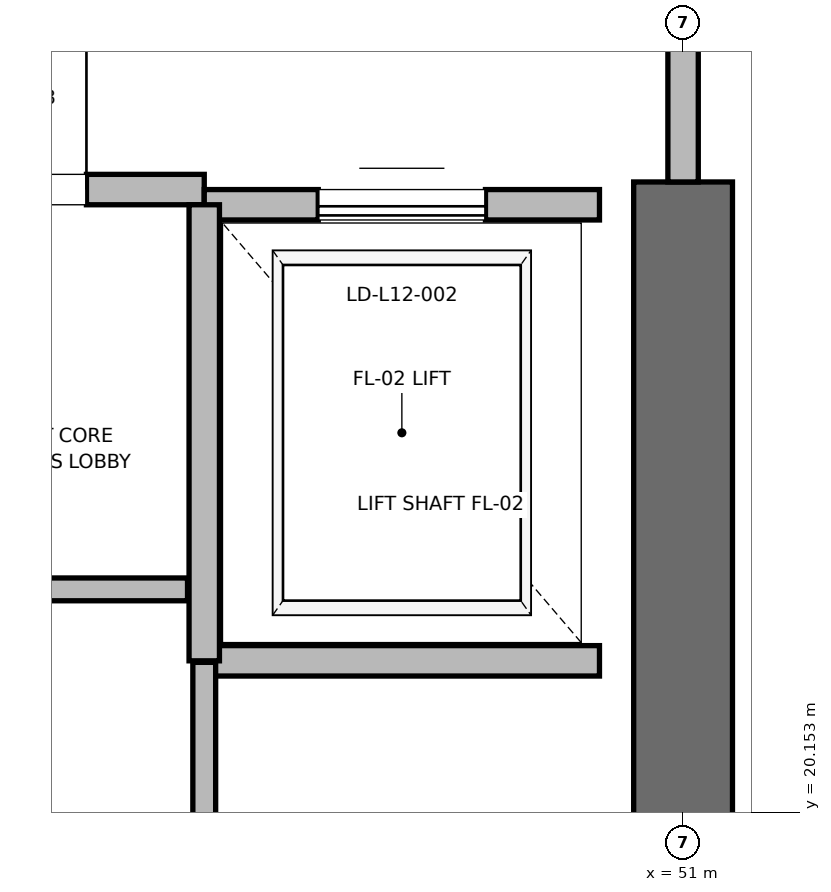
"""IFC4 building model, lengths in metres.
Left out: names, types, materials, properties, quantities, classifications, styles, units other than length and angle.
Written with IfcOpenShell. Run it as: python <this file> out.ifc"""

import sys

from ifc_helpers import new_model, si_unit, direction, frame, frame_2d, origin, place, context, subcontext, project, spatial, rectangle, extrude, element, fill, save


model = new_model("IFC4")
c1 = context("Model", 3, precision=1e-05, world=origin(), true_north=direction((0.0, 1.0)))
c2 = subcontext(c1, "Body", "Model", "MODEL_VIEW")
j1 = project(units=[si_unit("LENGTHUNIT", "METRE"), si_unit("PLANEANGLEUNIT", "RADIAN")], contexts=[c1])
p1 = place(None, origin())
s1 = spatial("IfcSite", under=j1, at=p1, CompositionType="ELEMENT")
p2 = place(p1, origin())
s2 = spatial("IfcBuilding", under=s1, at=p2, CompositionType="ELEMENT")
p3 = place(p2, frame((0.0, 0.0, 55.6)))
s3 = spatial("IfcBuildingStorey", under=s2, at=p3, CompositionType="ELEMENT", Elevation=55.6)
p4 = place(p3, frame((51.0, 18.5, 0.0), z_axis=(0.0, 0.0, 1.0), x_axis=(0.0, 1.0, 0.0)))
e1 = element("IfcWall", 1, at=p4, inside=s3, PredefinedType="SHEAR", context=c2, shape_type="SweptSolid", body=[
    extrude(rectangle(XDim=5.8, YDim=0.65, at=frame_2d((2.9, 0.0))), origin(), (0.0, 0.0, 1.0), 3.76),
])
p5 = place(p3, frame((45.15, 24.25, 0.0), z_axis=(0.0, 0.0, 1.0), x_axis=(1.0, 0.0, 0.0)))
e2 = element("IfcWall", 2, at=p5, inside=s3, PredefinedType="PARTITIONING", context=c2, shape_type="SweptSolid", body=[
    extrude(rectangle(XDim=2.7, YDim=0.2, at=frame_2d((1.35, 0.0))), origin(), (0.0, 0.0, 1.0), 3.76),
])
p6 = place(p5, frame((0.775, 0.0, 0.0)))
e3 = element("IfcOpeningElement", 3, at=p6, cuts=e2, PredefinedType="OPENING", context=c2, shape_type="SweptSolid", body=[
    extrude(rectangle(XDim=1.15, YDim=2.2, at=frame_2d((0.575, 1.1))), frame((0.0, 0.1, 0.0), z_axis=(0.0, -1.0, 0.0), x_axis=(1.0, 0.0, 0.0)), (0.0, 0.0, 1.0), 0.2),
])
p7 = place(p3, frame((51.0, 24.3, 0.0), z_axis=(0.0, 0.0, 1.0), x_axis=(0.0, 1.0, 0.0)))
e4 = element("IfcWall", 4, at=p7, inside=s3, PredefinedType="PARTITIONING", context=c2, shape_type="SweptSolid", body=[
    extrude(rectangle(XDim=3.4, YDim=0.2, at=frame_2d((1.7, 0.0))), origin(), (0.0, 0.0, 1.0), 2.54),
])
p8 = place(p7, frame((1.125, 0.0, 0.0)))
e5 = element("IfcOpeningElement", 5, at=p8, cuts=e4, PredefinedType="OPENING", context=c2, shape_type="SweptSolid", body=[
    extrude(rectangle(XDim=1.15, YDim=2.2, at=frame_2d((0.575, 1.1))), frame((0.0, 0.1, 0.0), z_axis=(0.0, -1.0, 0.0), x_axis=(1.0, 0.0, 0.0)), (0.0, 0.0, 1.0), 0.2),
])
p9 = place(p3, frame((47.85, 21.15, 0.0), z_axis=(0.0, 0.0, 1.0), x_axis=(1.0, 0.0, 0.0)))
e6 = element("IfcWall", 6, at=p9, inside=s3, PredefinedType="SOLIDWALL", context=c2, shape_type="SweptSolid", body=[
    extrude(rectangle(XDim=2.6, YDim=0.2, at=frame_2d((1.3, 0.0))), origin(), (0.0, 0.0, 1.0), 3.76),
])
p10 = place(p3, frame((50.45, 24.15, 0.0), z_axis=(0.0, 0.0, 1.0), x_axis=(-1.0, 0.0, 0.0)))
e7 = element("IfcWall", 7, at=p10, inside=s3, PredefinedType="SOLIDWALL", context=c2, shape_type="SweptSolid", body=[
    extrude(rectangle(XDim=2.6, YDim=0.2, at=frame_2d((1.3, 0.0))), origin(), (0.0, 0.0, 1.0), 2.54),
])
p11 = place(p10, frame((0.75, 0.0, 0.0)))
e8 = element("IfcOpeningElement", 8, at=p11, cuts=e7, PredefinedType="OPENING", context=c2, shape_type="SweptSolid", body=[
    extrude(rectangle(XDim=1.1, YDim=2.2, at=frame_2d((0.55, 1.1))), frame((0.0, 0.1, 0.0), z_axis=(0.0, -1.0, 0.0), x_axis=(1.0, 0.0, 0.0)), (0.0, 0.0, 1.0), 0.2),
])
p12 = place(p3, frame((47.85, 24.15, 0.0), z_axis=(0.0, 0.0, 1.0), x_axis=(0.0, -1.0, 0.0)))
e9 = element("IfcWall", 9, at=p12, inside=s3, PredefinedType="SOLIDWALL", context=c2, shape_type="SweptSolid", body=[
    extrude(rectangle(XDim=3.0, YDim=0.2, at=frame_2d((1.5, 0.0))), origin(), (0.0, 0.0, 1.0), 3.76),
])
p13 = place(p3, frame((47.85, 18.6, 0.0), z_axis=(0.0, 0.0, 1.0), x_axis=(0.0, 1.0, 0.0)))
e10 = element("IfcWall", 10, at=p13, inside=s3, PredefinedType="PARTITIONING", context=c2, shape_type="SweptSolid", body=[
    extrude(rectangle(XDim=2.54, YDim=0.15, at=frame_2d((1.27, 0.0))), origin(), (0.0, 0.0, 1.0), 2.85),
])
p14 = place(p3, frame((41.76, 21.62, 0.0), z_axis=(0.0, 0.0, 1.0), x_axis=(1.0, 0.0, 0.0)))
e11 = element("IfcWall", 11, at=p14, inside=s3, PredefinedType="PARTITIONING", context=c2, shape_type="SweptSolid", body=[
    extrude(rectangle(XDim=5.98, YDim=0.15, at=frame_2d((2.99, 0.0))), origin(), (0.0, 0.0, 1.0), 2.85),
])
p15 = place(p14, frame((2.49, 0.0, 0.0)))
e12 = element("IfcOpeningElement", 12, at=p15, cuts=e11, PredefinedType="OPENING", context=c2, shape_type="SweptSolid", body=[
    extrude(rectangle(XDim=1.0, YDim=2.15, at=frame_2d((0.5, 1.075))), frame((0.0, 0.075, 0.0), z_axis=(0.0, -1.0, 0.0), x_axis=(1.0, 0.0, 0.0)), (0.0, 0.0, 1.0), 0.15),
])
p16 = place(p6, origin())
e13 = element("IfcDoor", 13, at=p16, inside=s3, OperationType="SINGLE_SWING_RIGHT", PredefinedType="DOOR", context=c2, shape_type="SweptSolid", body=[
    extrude(rectangle(XDim=1.15, YDim=2.2, at=frame_2d((0.575, 1.1))), frame((0.0, 0.025, 0.0), z_axis=(0.0, -1.0, 0.0), x_axis=(1.0, 0.0, 0.0)), (0.0, 0.0, 1.0), 0.05),
])
fill(e3, e13)
p17 = place(p11, origin())
e14 = element("IfcDoor", 14, at=p17, inside=s3, OperationType="SLIDING_TO_RIGHT", PredefinedType="DOOR", context=c2, shape_type="SweptSolid", body=[
    extrude(rectangle(XDim=1.1, YDim=2.2, at=frame_2d((0.55, 1.1))), frame((0.0, 0.025, 0.0), z_axis=(0.0, -1.0, 0.0), x_axis=(1.0, 0.0, 0.0)), (0.0, 0.0, 1.0), 0.05),
])
fill(e8, e14)
save(model, sys.argv[1])
